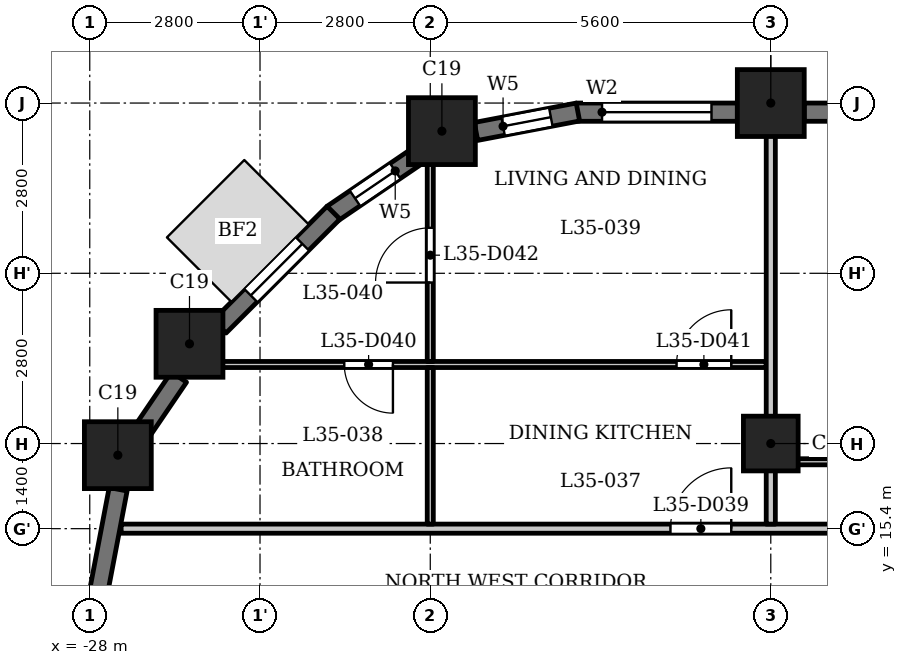
"""IFC4 building model, lengths in metres.
Left out: names, types, materials, properties, quantities, classifications, styles, units other than length and angle.
Written with IfcOpenShell. Run it as: python <this file> out.ifc"""

import sys

from ifc_helpers import new_model, si_unit, direction, frame, frame_2d, origin, origin_2d, place, context, subcontext, project, spatial, rectangle, extrude, element, fill, save


model = new_model("IFC4")
c1 = context("Model", 3, precision=1e-05, world=origin(), true_north=direction((0.0, 1.0)))
c2 = subcontext(c1, "Body", "Model", "MODEL_VIEW")
j1 = project(units=[si_unit("LENGTHUNIT", "METRE"), si_unit("PLANEANGLEUNIT", "RADIAN")], contexts=[c1])
p1 = place(None, origin())
s1 = spatial("IfcSite", under=j1, at=p1, CompositionType="ELEMENT")
p2 = place(p1, origin())
s2 = spatial("IfcBuilding", under=s1, at=p2, CompositionType="ELEMENT")
p3 = place(p2, frame((0.0, 0.0, 139.6)))
s3 = spatial("IfcBuildingStorey", under=s2, at=p3, CompositionType="ELEMENT", Elevation=139.6)
for number, where, z_axis, x_axis in (
    (1, (-16.8, 22.4, 0.0), (0.0, 0.0, 1.0), (1.0, 0.0, 0.0)),
    (2, (-22.209, 21.938, 0.0), (0.0, 0.0, 1.0), (1.0, 0.0, 0.0)),
    (3, (-26.36, 18.44, 0.0), (0.0, 0.0, 1.0), (1.0, 0.0, 0.0)),
    (4, (-27.538, 16.609, 0.0), (0.0, 0.0, 1.0), (1.0, 0.0, 0.0)),
):
    element("IfcColumn", number, at=place(p3, frame(where, z_axis=z_axis, x_axis=x_axis)), inside=s3, PredefinedType="COLUMN", context=c2, shape_type="SweptSolid", body=[
        extrude(rectangle(XDim=1.1, YDim=1.1, at=origin_2d()), origin(), (0.0, 0.0, 1.0), 3.5),
    ])
p4 = place(p3, frame((-16.8, 16.8, 0.0), z_axis=(0.0, 0.0, 1.0), x_axis=(1.0, 0.0, 0.0)))
e5 = element("IfcColumn", 5, at=p4, inside=s3, PredefinedType="COLUMN", context=c2, shape_type="SweptSolid", body=[
    extrude(rectangle(XDim=0.9, YDim=0.9, at=origin_2d()), origin(), (0.0, 0.0, 1.0), 3.5),
])
p5 = place(p3, frame((-11.75, 22.25, 0.0), z_axis=(0.0, 0.0, 1.0), x_axis=(-1.0, 0.0, 0.0)))
e6 = element("IfcWall", 6, at=p5, inside=s3, PredefinedType="SOLIDWALL", context=c2, shape_type="SweptSolid", body=[
    extrude(rectangle(XDim=4.5, YDim=0.3, at=frame_2d((2.25, 0.0))), origin(), (0.0, 0.0, 1.0), 2.45),
])
p6 = place(p5, frame((0.45, 0.0, 1.2)))
e7 = element("IfcOpeningElement", 7, at=p6, cuts=e6, PredefinedType="OPENING", context=c2, shape_type="SweptSolid", body=[
    extrude(rectangle(XDim=3.6, YDim=0.95, at=frame_2d((1.8, 0.475))), frame((0.0, 0.16, 0.0), z_axis=(0.0, -1.0, 0.0), x_axis=(1.0, 0.0, 0.0)), (0.0, 0.0, 1.0), 0.32),
])
p7 = place(p3, frame((-17.35, 22.25, 0.0), z_axis=(0.0, 0.0, 1.0), x_axis=(-1.0, 0.0, 0.0)))
e8 = element("IfcWall", 8, at=p7, inside=s3, PredefinedType="SOLIDWALL", context=c2, shape_type="SweptSolid", body=[
    extrude(rectangle(XDim=2.65, YDim=0.3, at=frame_2d((1.325, 0.0))), origin(), (0.0, 0.0, 1.0), 2.45),
])
p8 = place(p7, frame((0.425, 0.0, 0.9)))
e9 = element("IfcOpeningElement", 9, at=p8, cuts=e8, PredefinedType="OPENING", context=c2, shape_type="SweptSolid", body=[
    extrude(rectangle(XDim=1.8, YDim=1.25, at=frame_2d((0.9, 0.625))), frame((0.0, 0.16, 0.0), z_axis=(0.0, -1.0, 0.0), x_axis=(1.0, 0.0, 0.0)), (0.0, 0.0, 1.0), 0.32),
])
p9 = place(p3, frame((-19.972, 22.253, 0.0), z_axis=(0.0, 0.0, 1.0), x_axis=(-0.982297206936, -0.187329114784, 0.0)))
e10 = element("IfcWall", 10, at=p9, inside=s3, PredefinedType="SOLIDWALL", context=c2, shape_type="SweptSolid", body=[
    extrude(rectangle(XDim=1.706, YDim=0.3, at=frame_2d((0.853, 0.0))), origin(), (0.0, 0.0, 1.0), 2.45),
])
p10 = place(p9, frame((0.453, 0.0, 0.6)))
e11 = element("IfcOpeningElement", 11, at=p10, cuts=e10, PredefinedType="OPENING", context=c2, shape_type="SweptSolid", body=[
    extrude(rectangle(XDim=0.8, YDim=1.55, at=frame_2d((0.4, 0.775))), frame((0.0, 0.16, 0.0), z_axis=(0.0, -1.0, 0.0), x_axis=(1.0, 0.0, 0.0)), (0.0, 0.0, 1.0), 0.32),
])
p11 = place(p3, frame((-22.602, 21.538, 0.0), z_axis=(0.0, 0.0, 1.0), x_axis=(-0.827040942766, -0.562141689424, 0.0)))
e12 = element("IfcWall", 12, at=p11, inside=s3, PredefinedType="SOLIDWALL", context=c2, shape_type="SweptSolid", body=[
    extrude(rectangle(XDim=1.706, YDim=0.3, at=frame_2d((0.853, 0.0))), origin(), (0.0, 0.0, 1.0), 2.45),
])
p12 = place(p11, frame((0.453, 0.0, 0.6)))
e13 = element("IfcOpeningElement", 13, at=p12, cuts=e12, PredefinedType="OPENING", context=c2, shape_type="SweptSolid", body=[
    extrude(rectangle(XDim=0.8, YDim=1.55, at=frame_2d((0.4, 0.775))), frame((0.0, 0.16, 0.0), z_axis=(0.0, -1.0, 0.0), x_axis=(1.0, 0.0, 0.0)), (0.0, 0.0, 1.0), 0.32),
])
p13 = place(p3, frame((-23.991, 20.597, 0.0), z_axis=(0.0, 0.0, 1.0), x_axis=(-0.707106781187, -0.707106781187, 0.0)))
e14 = element("IfcWall", 14, at=p13, inside=s3, PredefinedType="SOLIDWALL", context=c2, shape_type="SweptSolid", body=[
    extrude(rectangle(XDim=2.65, YDim=0.3, at=frame_2d((1.325, 0.0))), origin(), (0.0, 0.0, 1.0), 2.45),
])
p14 = place(p13, frame((0.725, 0.0, 0.6)))
e15 = element("IfcOpeningElement", 15, at=p14, cuts=e14, PredefinedType="OPENING", context=c2, shape_type="SweptSolid", body=[
    extrude(rectangle(XDim=1.2, YDim=1.55, at=frame_2d((0.6, 0.775))), frame((0.0, 0.16, 0.0), z_axis=(0.0, -1.0, 0.0), x_axis=(1.0, 0.0, 0.0)), (0.0, 0.0, 1.0), 0.32),
])
p15 = place(p3, frame((-26.532, 17.893, 0.0), z_axis=(0.0, 0.0, 1.0), x_axis=(-0.562105419172, -0.82706559458, 0.0)))
e16 = element("IfcWall", 16, at=p15, inside=s3, PredefinedType="SOLIDWALL", context=c2, shape_type="SweptSolid", body=[
    extrude(rectangle(XDim=1.077, YDim=0.3, at=frame_2d((0.539, 0.0))), origin(), (0.0, 0.0, 1.0), 3.2),
])
p16 = place(p3, frame((-27.533, 16.048, 0.0), z_axis=(0.0, 0.0, 1.0), x_axis=(-0.187302784601, -0.982302227871, 0.0)))
e17 = element("IfcWall", 17, at=p16, inside=s3, PredefinedType="SOLIDWALL", context=c2, shape_type="SweptSolid", body=[
    extrude(rectangle(XDim=1.706, YDim=0.3, at=frame_2d((0.853, 0.0))), origin(), (0.0, 0.0, 1.0), 2.45),
])
p17 = place(p3, frame((-27.484, 15.4, 0.0), z_axis=(0.0, 0.0, 1.0), x_axis=(1.0, 0.0, 0.0)))
e18 = element("IfcWall", 18, at=p17, inside=s3, PredefinedType="PARTITIONING", context=c2, shape_type="SweptSolid", body=[
    extrude(rectangle(XDim=12.559, YDim=0.15, at=frame_2d((6.279, 0.0))), origin(), (0.0, 0.0, 1.0), 3.2),
])
p18 = place(p17, frame((9.034, 0.0, 0.0)))
e19 = element("IfcOpeningElement", 19, at=p18, cuts=e18, PredefinedType="OPENING", context=c2, shape_type="SweptSolid", body=[
    extrude(rectangle(XDim=1.0, YDim=2.1, at=frame_2d((0.5, 1.05))), frame((0.0, 0.085, 0.0), z_axis=(0.0, -1.0, 0.0), x_axis=(1.0, 0.0, 0.0)), (0.0, 0.0, 1.0), 0.17),
])
p19 = place(p3, frame((-16.725, 16.5, 0.0), z_axis=(0.0, 0.0, 1.0), x_axis=(1.0, 0.0, 0.0)))
e20 = element("IfcWall", 20, at=p19, inside=s3, PredefinedType="PARTITIONING", context=c2, shape_type="SweptSolid", body=[
    extrude(rectangle(XDim=33.45, YDim=0.1, at=frame_2d((16.725, 0.0))), origin(), (0.0, 0.0, 1.0), 3.2),
])
p20 = place(p19, frame((9.675, 0.0, 0.0)))
e21 = element("IfcOpeningElement", 21, at=p20, cuts=e20, PredefinedType="OPENING", context=c2, shape_type="SweptSolid", body=[
    extrude(rectangle(XDim=0.8, YDim=2.1, at=frame_2d((0.4, 1.05))), frame((0.0, 0.06, 0.0), z_axis=(0.0, -1.0, 0.0), x_axis=(1.0, 0.0, 0.0)), (0.0, 0.0, 1.0), 0.12),
])
p21 = place(p19, frame((3.975, 0.0, 0.0)))
e22 = element("IfcOpeningElement", 22, at=p21, cuts=e20, PredefinedType="OPENING", context=c2, shape_type="SweptSolid", body=[
    extrude(rectangle(XDim=0.9, YDim=2.1, at=frame_2d((0.45, 1.05))), frame((0.0, 0.06, 0.0), z_axis=(0.0, -1.0, 0.0), x_axis=(1.0, 0.0, 0.0)), (0.0, 0.0, 1.0), 0.12),
])
p22 = place(p19, frame((12.025, 0.0, 0.0)))
e23 = element("IfcOpeningElement", 23, at=p22, cuts=e20, PredefinedType="OPENING", context=c2, shape_type="SweptSolid", body=[
    extrude(rectangle(XDim=0.8, YDim=2.1, at=frame_2d((0.4, 1.05))), frame((0.0, 0.06, 0.0), z_axis=(0.0, -1.0, 0.0), x_axis=(1.0, 0.0, 0.0)), (0.0, 0.0, 1.0), 0.12),
])
p23 = place(p19, frame((15.175, 0.0, 0.0)))
e24 = element("IfcOpeningElement", 24, at=p23, cuts=e20, PredefinedType="OPENING", context=c2, shape_type="SweptSolid", body=[
    extrude(rectangle(XDim=0.9, YDim=2.1, at=frame_2d((0.45, 1.05))), frame((0.0, 0.06, 0.0), z_axis=(0.0, -1.0, 0.0), x_axis=(1.0, 0.0, 0.0)), (0.0, 0.0, 1.0), 0.12),
])
p24 = place(p19, frame((20.975, 0.0, 0.0)))
e25 = element("IfcOpeningElement", 25, at=p24, cuts=e20, PredefinedType="OPENING", context=c2, shape_type="SweptSolid", body=[
    extrude(rectangle(XDim=0.8, YDim=2.1, at=frame_2d((0.4, 1.05))), frame((0.0, 0.06, 0.0), z_axis=(0.0, -1.0, 0.0), x_axis=(1.0, 0.0, 0.0)), (0.0, 0.0, 1.0), 0.12),
])
p25 = place(p19, frame((18.175, 0.0, 0.0)))
e26 = element("IfcOpeningElement", 26, at=p25, cuts=e20, PredefinedType="OPENING", context=c2, shape_type="SweptSolid", body=[
    extrude(rectangle(XDim=0.9, YDim=2.1, at=frame_2d((0.45, 1.05))), frame((0.0, 0.06, 0.0), z_axis=(0.0, -1.0, 0.0), x_axis=(1.0, 0.0, 0.0)), (0.0, 0.0, 1.0), 0.12),
])
p26 = place(p19, frame((23.725, 0.0, 0.0)))
e27 = element("IfcOpeningElement", 27, at=p26, cuts=e20, PredefinedType="OPENING", context=c2, shape_type="SweptSolid", body=[
    extrude(rectangle(XDim=0.8, YDim=2.1, at=frame_2d((0.4, 1.05))), frame((0.0, 0.06, 0.0), z_axis=(0.0, -1.0, 0.0), x_axis=(1.0, 0.0, 0.0)), (0.0, 0.0, 1.0), 0.12),
])
p27 = place(p19, frame((26.125, 0.0, 0.0)))
e28 = element("IfcOpeningElement", 28, at=p27, cuts=e20, PredefinedType="OPENING", context=c2, shape_type="SweptSolid", body=[
    extrude(rectangle(XDim=0.9, YDim=2.1, at=frame_2d((0.45, 1.05))), frame((0.0, 0.06, 0.0), z_axis=(0.0, -1.0, 0.0), x_axis=(1.0, 0.0, 0.0)), (0.0, 0.0, 1.0), 0.12),
])
p28 = place(p19, frame((32.125, 0.0, 0.0)))
e29 = element("IfcOpeningElement", 29, at=p28, cuts=e20, PredefinedType="OPENING", context=c2, shape_type="SweptSolid", body=[
    extrude(rectangle(XDim=0.8, YDim=2.1, at=frame_2d((0.4, 1.05))), frame((0.0, 0.06, 0.0), z_axis=(0.0, -1.0, 0.0), x_axis=(1.0, 0.0, 0.0)), (0.0, 0.0, 1.0), 0.12),
])
p29 = place(p19, frame((28.975, 0.0, 0.0)))
e30 = element("IfcOpeningElement", 30, at=p29, cuts=e20, PredefinedType="OPENING", context=c2, shape_type="SweptSolid", body=[
    extrude(rectangle(XDim=0.9, YDim=2.1, at=frame_2d((0.45, 1.05))), frame((0.0, 0.06, 0.0), z_axis=(0.0, -1.0, 0.0), x_axis=(1.0, 0.0, 0.0)), (0.0, 0.0, 1.0), 0.12),
])
p30 = place(p3, frame((-26.44, 18.1, 0.0), z_axis=(0.0, 0.0, 1.0), x_axis=(1.0, 0.0, 0.0)))
e31 = element("IfcWall", 31, at=p30, inside=s3, PredefinedType="PARTITIONING", context=c2, shape_type="SweptSolid", body=[
    extrude(rectangle(XDim=9.565, YDim=0.1, at=frame_2d((4.782, 0.0))), origin(), (0.0, 0.0, 1.0), 3.2),
])
p31 = place(p30, frame((2.626, 0.0, 0.0)))
e32 = element("IfcOpeningElement", 32, at=p31, cuts=e31, PredefinedType="OPENING", context=c2, shape_type="SweptSolid", body=[
    extrude(rectangle(XDim=0.8, YDim=2.1, at=frame_2d((0.4, 1.05))), frame((0.0, 0.06, 0.0), z_axis=(0.0, -1.0, 0.0), x_axis=(1.0, 0.0, 0.0)), (0.0, 0.0, 1.0), 0.12),
])
p32 = place(p30, frame((8.09, 0.0, 0.0)))
e33 = element("IfcOpeningElement", 33, at=p32, cuts=e31, PredefinedType="OPENING", context=c2, shape_type="SweptSolid", body=[
    extrude(rectangle(XDim=0.9, YDim=2.1, at=frame_2d((0.45, 1.05))), frame((0.0, 0.06, 0.0), z_axis=(0.0, -1.0, 0.0), x_axis=(1.0, 0.0, 0.0)), (0.0, 0.0, 1.0), 0.12),
])
p33 = place(p3, frame((-22.4, 15.475, 0.0), z_axis=(0.0, 0.0, 1.0), x_axis=(0.0, 1.0, 0.0)))
e34 = element("IfcWall", 34, at=p33, inside=s3, PredefinedType="PARTITIONING", context=c2, shape_type="SweptSolid", body=[
    extrude(rectangle(XDim=2.575, YDim=0.1, at=frame_2d((1.288, 0.0))), origin(), (0.0, 0.0, 1.0), 3.2),
])
p34 = place(p3, frame((-22.4, 18.15, 0.0), z_axis=(0.0, 0.0, 1.0), x_axis=(0.0, 1.0, 0.0)))
e35 = element("IfcWall", 35, at=p34, inside=s3, PredefinedType="PARTITIONING", context=c2, shape_type="SweptSolid", body=[
    extrude(rectangle(XDim=3.57, YDim=0.1, at=frame_2d((1.785, 0.0))), origin(), (0.0, 0.0, 1.0), 3.2),
])
p35 = place(p34, frame((1.298, 0.0, 0.0)))
e36 = element("IfcOpeningElement", 36, at=p35, cuts=e35, PredefinedType="OPENING", context=c2, shape_type="SweptSolid", body=[
    extrude(rectangle(XDim=0.9, YDim=2.1, at=frame_2d((0.45, 1.05))), frame((0.0, 0.06, 0.0), z_axis=(0.0, -1.0, 0.0), x_axis=(1.0, 0.0, 0.0)), (0.0, 0.0, 1.0), 0.12),
])
p36 = place(p3, frame((-16.8, 15.475, 0.0), z_axis=(0.0, 0.0, 1.0), x_axis=(0.0, 1.0, 0.0)))
e37 = element("IfcWall", 37, at=p36, inside=s3, PredefinedType="PARTITIONING", context=c2, shape_type="SweptSolid", body=[
    extrude(rectangle(XDim=7.455, YDim=0.15, at=frame_2d((3.728, 0.0))), origin(), (0.0, 0.0, 1.0), 3.2),
])
p37 = place(p18, origin())
e38 = element("IfcDoor", 38, at=p37, inside=s3, OperationType="SINGLE_SWING_LEFT", PredefinedType="DOOR", context=c2, shape_type="SweptSolid", body=[
    extrude(rectangle(XDim=1.0, YDim=2.1, at=frame_2d((0.5, 1.05))), frame((0.0, 0.025, 0.0), z_axis=(0.0, -1.0, 0.0), x_axis=(1.0, 0.0, 0.0)), (0.0, 0.0, 1.0), 0.05),
])
fill(e19, e38)
p38 = place(p31, origin())
e39 = element("IfcDoor", 39, at=p38, inside=s3, OperationType="SINGLE_SWING_RIGHT", PredefinedType="DOOR", context=c2, shape_type="SweptSolid", body=[
    extrude(rectangle(XDim=0.8, YDim=2.1, at=frame_2d((0.4, 1.05))), frame((0.0, 0.025, 0.0), z_axis=(0.0, -1.0, 0.0), x_axis=(1.0, 0.0, 0.0)), (0.0, 0.0, 1.0), 0.05),
])
fill(e32, e39)
p39 = place(p32, origin())
e40 = element("IfcDoor", 40, at=p39, inside=s3, OperationType="SINGLE_SWING_LEFT", PredefinedType="DOOR", context=c2, shape_type="SweptSolid", body=[
    extrude(rectangle(XDim=0.9, YDim=2.1, at=frame_2d((0.45, 1.05))), frame((0.0, 0.025, 0.0), z_axis=(0.0, -1.0, 0.0), x_axis=(1.0, 0.0, 0.0)), (0.0, 0.0, 1.0), 0.05),
])
fill(e33, e40)
p40 = place(p35, origin())
e41 = element("IfcDoor", 41, at=p40, inside=s3, OperationType="SINGLE_SWING_RIGHT", PredefinedType="DOOR", context=c2, shape_type="SweptSolid", body=[
    extrude(rectangle(XDim=0.9, YDim=2.1, at=frame_2d((0.45, 1.05))), frame((0.0, 0.025, 0.0), z_axis=(0.0, -1.0, 0.0), x_axis=(1.0, 0.0, 0.0)), (0.0, 0.0, 1.0), 0.05),
])
fill(e36, e41)
p41 = place(p8, origin())
e42 = element("IfcWindow", 42, at=p41, inside=s3, PartitioningType="SINGLE_PANEL", PredefinedType="WINDOW", context=c2, shape_type="SweptSolid", body=[
    extrude(rectangle(XDim=1.8, YDim=1.25, at=frame_2d((0.9, 0.625))), frame((0.0, 0.03, 0.0), z_axis=(0.0, -1.0, 0.0), x_axis=(1.0, 0.0, 0.0)), (0.0, 0.0, 1.0), 0.06),
])
fill(e9, e42)
p42 = place(p10, origin())
e43 = element("IfcWindow", 43, at=p42, inside=s3, PartitioningType="SINGLE_PANEL", PredefinedType="WINDOW", context=c2, shape_type="SweptSolid", body=[
    extrude(rectangle(XDim=0.8, YDim=1.55, at=frame_2d((0.4, 0.775))), frame((0.0, 0.03, 0.0), z_axis=(0.0, -1.0, 0.0), x_axis=(1.0, 0.0, 0.0)), (0.0, 0.0, 1.0), 0.06),
])
fill(e11, e43)
p43 = place(p12, origin())
e44 = element("IfcWindow", 44, at=p43, inside=s3, PartitioningType="SINGLE_PANEL", PredefinedType="WINDOW", context=c2, shape_type="SweptSolid", body=[
    extrude(rectangle(XDim=0.8, YDim=1.55, at=frame_2d((0.4, 0.775))), frame((0.0, 0.03, 0.0), z_axis=(0.0, -1.0, 0.0), x_axis=(1.0, 0.0, 0.0)), (0.0, 0.0, 1.0), 0.06),
])
fill(e13, e44)
p44 = place(p14, origin())
e45 = element("IfcWindow", 45, at=p44, inside=s3, PartitioningType="SINGLE_PANEL", PredefinedType="WINDOW", context=c2, shape_type="SweptSolid", body=[
    extrude(rectangle(XDim=1.2, YDim=1.55, at=frame_2d((0.6, 0.775))), frame((0.0, 0.03, 0.0), z_axis=(0.0, -1.0, 0.0), x_axis=(1.0, 0.0, 0.0)), (0.0, 0.0, 1.0), 0.06),
])
fill(e15, e45)
save(model, sys.argv[1])
